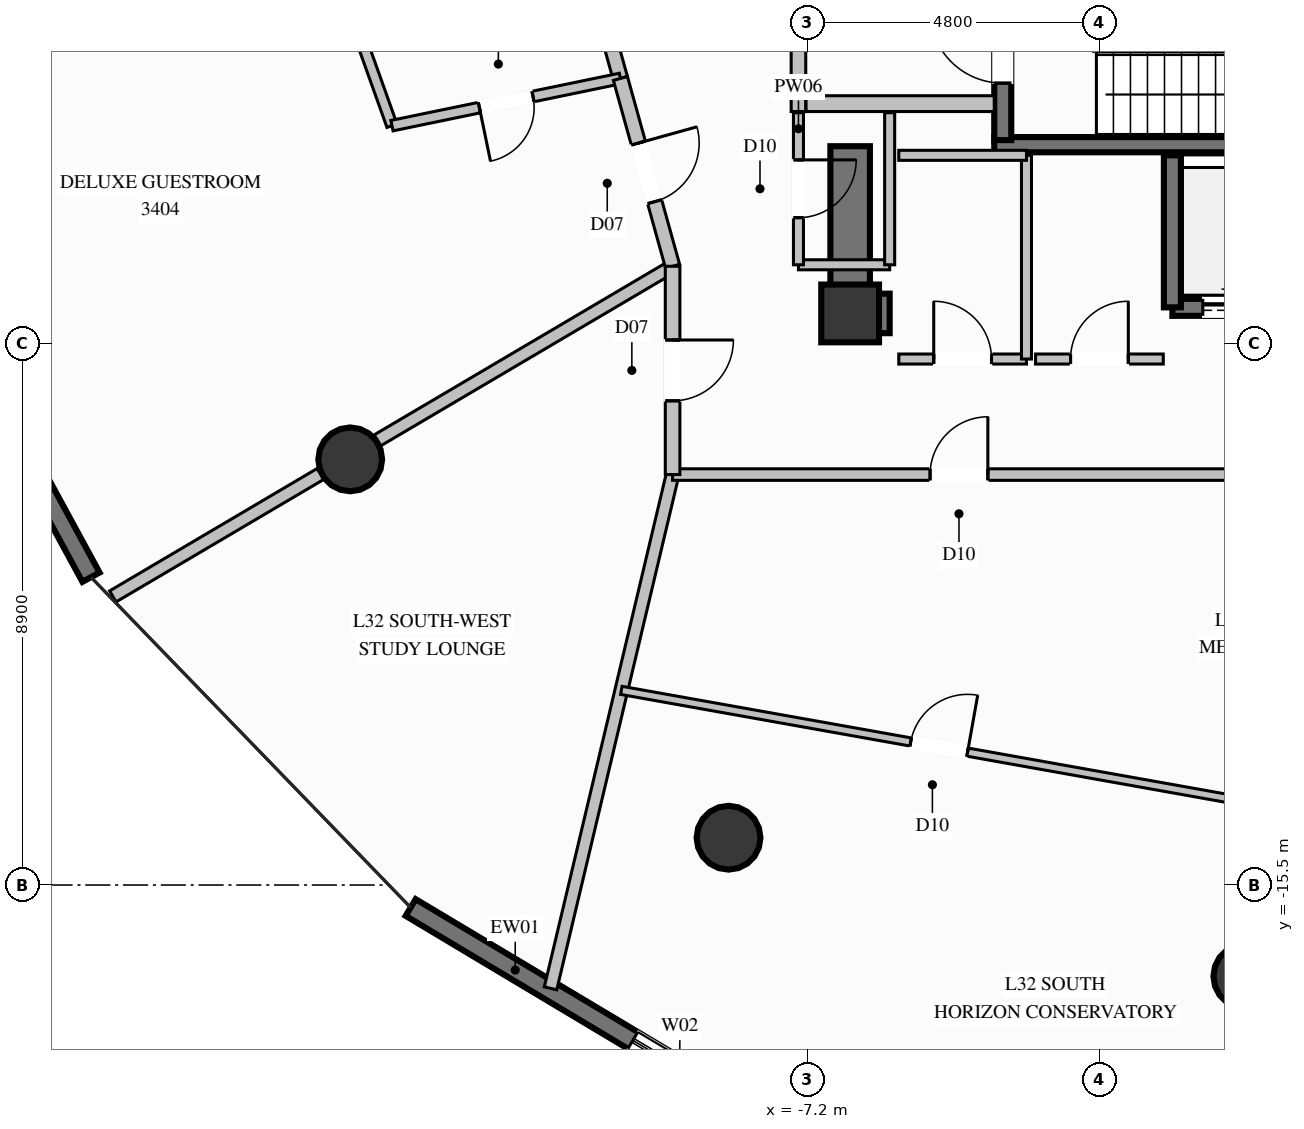
"""IFC4 building model, lengths in metres.
Left out: names, types, materials, properties, quantities, classifications, styles, units other than length and angle.
Written with IfcOpenShell. Run it as: python <this file> out.ifc"""

import sys

from ifc_helpers import new_model, si_unit, direction, frame, frame_2d, origin, origin_2d, place, context, subcontext, project, spatial, rectangle, circle, extrude, element, fill, save


model = new_model("IFC4")
c1 = context("Model", 3, precision=1e-05, world=origin(), true_north=direction((0.0, 1.0)))
c2 = subcontext(c1, "Body", "Model", "MODEL_VIEW")
j1 = project(units=[si_unit("LENGTHUNIT", "METRE"), si_unit("PLANEANGLEUNIT", "RADIAN")], contexts=[c1])
p1 = place(None, origin())
s1 = spatial("IfcSite", under=j1, at=p1, CompositionType="ELEMENT")
p2 = place(p1, origin())
s2 = spatial("IfcBuilding", under=s1, at=p2, CompositionType="ELEMENT")
p3 = place(p2, frame((0.0, 0.0, 127.8)))
s3 = spatial("IfcBuildingStorey", under=s2, at=p3, CompositionType="ELEMENT", Elevation=127.8)
p4 = place(p3, frame((-6.5, -6.1, 0.0), z_axis=(0.0, 0.0, 1.0), x_axis=(1.0, 0.0, 0.0)))
e1 = element("IfcColumn", 1, at=p4, inside=s3, PredefinedType="COLUMN", context=c2, shape_type="SweptSolid", body=[
    extrude(rectangle(XDim=0.95, YDim=0.95, at=origin_2d()), origin(), (0.0, 0.0, 1.0), 3.6),
])
p5 = place(p3, frame((-4.13, -3.325, 0.0), z_axis=(0.0, 0.0, 1.0), x_axis=(1.0, 0.0, 0.0)))
e2 = element("IfcWall", 2, at=p5, inside=s3, PredefinedType="SOLIDWALL", context=c2, shape_type="SweptSolid", body=[
    extrude(rectangle(XDim=8.26, YDim=0.25, at=frame_2d((4.13, 0.0))), origin(), (0.0, 0.0, 1.0), 3.6),
])
p6 = place(p3, frame((-6.175, -6.1, 0.0), z_axis=(0.0, 0.0, 1.0), x_axis=(1.0, 0.0, 0.0)))
e3 = element("IfcWall", 3, at=p6, inside=s3, PredefinedType="SHEAR", context=c2, shape_type="SweptSolid", body=[
    extrude(rectangle(XDim=0.325, YDim=0.65, at=frame_2d((0.163, 0.0))), origin(), (0.0, 0.0, 1.0), 3.6),
])
p7 = place(p3, frame((-6.5, -6.425, 0.0), z_axis=(0.0, 0.0, 1.0), x_axis=(0.0, 1.0, 0.0)))
e4 = element("IfcWall", 4, at=p7, inside=s3, PredefinedType="SHEAR", context=c2, shape_type="SweptSolid", body=[
    extrude(rectangle(XDim=3.075, YDim=0.65, at=frame_2d((1.538, 0.0))), origin(), (0.0, 0.0, 1.0), 3.6),
])
for number, where, z_axis, x_axis in (
    (5, (-14.722, -8.5, 0.0), (0.0, 0.0, 1.0), (1.0, 0.0, 0.0)),
    (6, (-8.5, -14.722, 0.0), (0.0, 0.0, 1.0), (1.0, 0.0, 0.0)),
    (7, (0.0, -17.0, 0.0), (0.0, 0.0, 1.0), (1.0, 0.0, 0.0)),
):
    element("IfcColumn", number, at=place(p3, frame(where, z_axis=z_axis, x_axis=x_axis)), inside=s3, PredefinedType="COLUMN", context=c2, shape_type="SweptSolid", body=[
        extrude(circle(Radius=0.525, at=origin_2d()), origin(), (0.0, 0.0, 1.0), 3.6),
    ])
p8 = place(p3, frame((-18.985, -10.438, 0.0), z_axis=(0.0, 0.0, 1.0), x_axis=(-0.478034683055, 0.878340959876, 0.0)))
e8 = element("IfcWall", 8, at=p8, inside=s3, PredefinedType="SOLIDWALL", context=c2, shape_type="SweptSolid", body=[
    extrude(rectangle(XDim=7.347, YDim=0.32, at=frame_2d((3.673, 0.0))), origin(), (0.0, 0.0, 1.0), 3.35),
])
p9 = place(p8, frame((2.773, 0.0, 0.35)))
e9 = element("IfcOpeningElement", 9, at=p9, cuts=e8, PredefinedType="OPENING", context=c2, shape_type="SweptSolid", body=[
    extrude(rectangle(XDim=1.8, YDim=2.6, at=frame_2d((0.9, 1.3))), frame((0.0, 0.17, 0.0), z_axis=(0.0, -1.0, 0.0), x_axis=(1.0, 0.0, 0.0)), (0.0, 0.0, 1.0), 0.34),
])
p10 = place(p3, frame((-7.24, -19.748, 0.0), z_axis=(0.0, 0.0, 1.0), x_axis=(-0.858360940194, 0.51304629065, 0.0)))
e10 = element("IfcWall", 10, at=p10, inside=s3, PredefinedType="SOLIDWALL", context=c2, shape_type="SweptSolid", body=[
    extrude(rectangle(XDim=7.559, YDim=0.32, at=frame_2d((3.779, 0.0))), origin(), (0.0, 0.0, 1.0), 3.35),
])
p11 = place(p10, frame((1.501, 0.0, 0.35)))
e11 = element("IfcOpeningElement", 11, at=p11, cuts=e10, PredefinedType="OPENING", context=c2, shape_type="SweptSolid", body=[
    extrude(rectangle(XDim=1.8, YDim=2.6, at=frame_2d((0.9, 1.3))), frame((0.0, 0.17, 0.0), z_axis=(0.0, -1.0, 0.0), x_axis=(1.0, 0.0, 0.0)), (0.0, 0.0, 1.0), 0.34),
])
p12 = place(p3, frame((-1.2, -6.0, 0.0), z_axis=(0.0, 0.0, 1.0), x_axis=(1.0, 0.0, 0.0)))
e12 = element("IfcWall", 12, at=p12, inside=s3, PredefinedType="SOLIDWALL", context=c2, shape_type="SweptSolid", body=[
    extrude(rectangle(XDim=2.1, YDim=0.28, at=frame_2d((1.05, 0.0))), origin(), (0.0, 0.0, 1.0), 3.35),
])
p13 = place(p12, frame((0.5, 0.0, 0.0)))
e13 = element("IfcOpeningElement", 13, at=p13, cuts=e12, PredefinedType="OPENING", context=c2, shape_type="SweptSolid", body=[
    extrude(rectangle(XDim=1.1, YDim=2.2, at=frame_2d((0.55, 1.1))), frame((0.0, 0.15, 0.0), z_axis=(0.0, -1.0, 0.0), x_axis=(1.0, 0.0, 0.0)), (0.0, 0.0, 1.0), 0.3),
])
p14 = place(p3, frame((-1.2, -3.5, 0.0), z_axis=(0.0, 0.0, 1.0), x_axis=(0.0, -1.0, 0.0)))
e14 = element("IfcWall", 14, at=p14, inside=s3, PredefinedType="SOLIDWALL", context=c2, shape_type="SweptSolid", body=[
    extrude(rectangle(XDim=2.5, YDim=0.28, at=frame_2d((1.25, 0.0))), origin(), (0.0, 0.0, 1.0), 3.35),
])
p15 = place(p3, frame((-3.99, -3.25, 0.0), z_axis=(0.0, 0.0, 1.0), x_axis=(0.0, 1.0, 0.0)))
e15 = element("IfcWall", 15, at=p15, inside=s3, PredefinedType="SOLIDWALL", context=c2, shape_type="SweptSolid", body=[
    extrude(rectangle(XDim=5.46, YDim=0.28, at=frame_2d((2.73, 0.0))), origin(), (0.0, 0.0, 1.0), 3.35),
])
p16 = place(p15, frame((0.937, 0.0, 0.0)))
e16 = element("IfcOpeningElement", 16, at=p16, cuts=e15, PredefinedType="OPENING", context=c2, shape_type="SweptSolid", body=[
    extrude(rectangle(XDim=1.2, YDim=2.2, at=frame_2d((0.6, 1.1))), frame((0.0, 0.15, 0.0), z_axis=(0.0, -1.0, 0.0), x_axis=(1.0, 0.0, 0.0)), (0.0, 0.0, 1.0), 0.3),
])
p17 = place(p3, frame((-7.35, -2.78, 0.0), z_axis=(0.0, 0.0, 1.0), x_axis=(0.0, 1.0, 0.0)))
e17 = element("IfcWall", 17, at=p17, inside=s3, PredefinedType="PARTITIONING", context=c2, shape_type="SweptSolid", body=[
    extrude(rectangle(XDim=5.12, YDim=0.24, at=frame_2d((2.56, 0.0))), origin(), (0.0, 0.0, 1.0), 2.435),
])
p18 = place(p17, frame((1.389, 0.0, 0.0)))
e18 = element("IfcOpeningElement", 18, at=p18, cuts=e17, PredefinedType="OPENING", context=c2, shape_type="SweptSolid", body=[
    extrude(rectangle(XDim=1.15, YDim=2.2, at=frame_2d((0.575, 1.1))), frame((0.0, 0.13, 0.0), z_axis=(0.0, -1.0, 0.0), x_axis=(1.0, 0.0, 0.0)), (0.0, 0.0, 1.0), 0.26),
])
p19 = place(p3, frame((-7.225, -2.65, 0.0), z_axis=(0.0, 0.0, 1.0), x_axis=(1.0, 0.0, 0.0)))
e19 = element("IfcWall", 19, at=p19, inside=s3, PredefinedType="PARTITIONING", context=c2, shape_type="SweptSolid", body=[
    extrude(rectangle(XDim=3.095, YDim=0.26, at=frame_2d((1.548, 0.0))), origin(), (0.0, 0.0, 1.0), 3.35),
])
p20 = place(p3, frame((-7.35, -5.3, 0.0), z_axis=(0.0, 0.0, 1.0), x_axis=(1.0, 0.0, 0.0)))
e20 = element("IfcWall", 20, at=p20, inside=s3, PredefinedType="PARTITIONING", context=c2, shape_type="SweptSolid", body=[
    extrude(rectangle(XDim=1.5, YDim=0.165, at=frame_2d((0.75, 0.0))), origin(), (0.0, 0.0, 1.0), 2.435),
])
p21 = place(p3, frame((-5.85, -5.3, 0.0), z_axis=(0.0, 0.0, 1.0), x_axis=(0.0, 1.0, 0.0)))
e21 = element("IfcWall", 21, at=p21, inside=s3, PredefinedType="PARTITIONING", context=c2, shape_type="SweptSolid", body=[
    extrude(rectangle(XDim=2.5, YDim=0.165, at=frame_2d((1.25, 0.0))), origin(), (0.0, 0.0, 1.0), 2.435),
])
p22 = place(p3, frame((-7.35, -2.8, 0.0), z_axis=(0.0, 0.0, 1.0), x_axis=(0.0, -1.0, 0.0)))
e22 = element("IfcWall", 22, at=p22, inside=s3, PredefinedType="PARTITIONING", context=c2, shape_type="SweptSolid", body=[
    extrude(rectangle(XDim=2.5, YDim=0.165, at=frame_2d((1.25, 0.0))), origin(), (0.0, 0.0, 1.0), 3.35),
])
p23 = place(p22, frame((0.775, 0.0, 0.0)))
e23 = element("IfcOpeningElement", 23, at=p23, cuts=e22, PredefinedType="OPENING", context=c2, shape_type="SweptSolid", body=[
    extrude(rectangle(XDim=0.95, YDim=2.1, at=frame_2d((0.475, 1.05))), frame((0.0, 0.093, 0.0), z_axis=(0.0, -1.0, 0.0), x_axis=(1.0, 0.0, 0.0)), (0.0, 0.0, 1.0), 0.185),
])
p24 = place(p3, frame((-5.7, -6.85, 0.0), z_axis=(0.0, 0.0, 1.0), x_axis=(1.0, 0.0, 0.0)))
e24 = element("IfcWall", 24, at=p24, inside=s3, PredefinedType="PARTITIONING", context=c2, shape_type="SweptSolid", body=[
    extrude(rectangle(XDim=2.1, YDim=0.165, at=frame_2d((1.05, 0.0))), origin(), (0.0, 0.0, 1.0), 2.435),
])
p25 = place(p24, frame((0.575, 0.0, 0.0)))
e25 = element("IfcOpeningElement", 25, at=p25, cuts=e24, PredefinedType="OPENING", context=c2, shape_type="SweptSolid", body=[
    extrude(rectangle(XDim=0.95, YDim=2.1, at=frame_2d((0.475, 1.05))), frame((0.0, 0.093, 0.0), z_axis=(0.0, -1.0, 0.0), x_axis=(1.0, 0.0, 0.0)), (0.0, 0.0, 1.0), 0.185),
])
p26 = place(p3, frame((-3.6, -6.85, 0.0), z_axis=(0.0, 0.0, 1.0), x_axis=(0.0, 1.0, 0.0)))
e26 = element("IfcWall", 26, at=p26, inside=s3, PredefinedType="PARTITIONING", context=c2, shape_type="SweptSolid", body=[
    extrude(rectangle(XDim=3.35, YDim=0.165, at=frame_2d((1.675, 0.0))), origin(), (0.0, 0.0, 1.0), 3.35),
])
p27 = place(p3, frame((-3.6, -3.5, 0.0), z_axis=(0.0, 0.0, 1.0), x_axis=(-1.0, 0.0, 0.0)))
e27 = element("IfcWall", 27, at=p27, inside=s3, PredefinedType="PARTITIONING", context=c2, shape_type="SweptSolid", body=[
    extrude(rectangle(XDim=2.1, YDim=0.165, at=frame_2d((1.05, 0.0))), origin(), (0.0, 0.0, 1.0), 3.35),
])
p28 = place(p3, frame((-3.45, -6.85, 0.0), z_axis=(0.0, 0.0, 1.0), x_axis=(1.0, 0.0, 0.0)))
e28 = element("IfcWall", 28, at=p28, inside=s3, PredefinedType="PARTITIONING", context=c2, shape_type="SweptSolid", body=[
    extrude(rectangle(XDim=2.1, YDim=0.165, at=frame_2d((1.05, 0.0))), origin(), (0.0, 0.0, 1.0), 2.435),
])
p29 = place(p28, frame((0.575, 0.0, 0.0)))
e29 = element("IfcOpeningElement", 29, at=p29, cuts=e28, PredefinedType="OPENING", context=c2, shape_type="SweptSolid", body=[
    extrude(rectangle(XDim=0.95, YDim=2.1, at=frame_2d((0.475, 1.05))), frame((0.0, 0.093, 0.0), z_axis=(0.0, -1.0, 0.0), x_axis=(1.0, 0.0, 0.0)), (0.0, 0.0, 1.0), 0.185),
])
p30 = place(p3, frame((-9.42, -5.325, 0.0), z_axis=(0.0, 0.0, 1.0), x_axis=(-0.861378052692, -0.507964418381, 0.0)))
e30 = element("IfcWall", 30, at=p30, inside=s3, PredefinedType="PARTITIONING", context=c2, shape_type="SweptSolid", body=[
    extrude(rectangle(XDim=5.636, YDim=0.21, at=frame_2d((2.818, 0.0))), origin(), (0.0, 0.0, 1.0), 2.717),
])
p31 = place(p3, frame((-15.211, -8.74, 0.0), z_axis=(0.0, 0.0, 1.0), x_axis=(-0.861374884853, -0.507969790188, 0.0)))
e31 = element("IfcWall", 31, at=p31, inside=s3, PredefinedType="PARTITIONING", context=c2, shape_type="SweptSolid", body=[
    extrude(rectangle(XDim=3.965, YDim=0.21, at=frame_2d((1.982, 0.0))), origin(), (0.0, 0.0, 1.0), 3.35),
])
p32 = place(p3, frame((-10.9, 0.0, 0.0), z_axis=(0.0, 0.0, 1.0), x_axis=(0.267920543299, -0.963441011416, 0.0)))
e32 = element("IfcWall", 32, at=p32, inside=s3, PredefinedType="PARTITIONING", context=c2, shape_type="SweptSolid", body=[
    extrude(rectangle(XDim=2.321, YDim=0.24, at=frame_2d((1.161, 0.0))), origin(), (0.0, 0.0, 1.0), 3.35),
])
p33 = place(p3, frame((-15.111, 0.0, 0.0), z_axis=(0.0, 0.0, 1.0), x_axis=(0.336466950823, -0.941695275025, 0.0)))
e33 = element("IfcWall", 33, at=p33, inside=s3, PredefinedType="PLUMBINGWALL", context=c2, shape_type="SweptSolid", body=[
    extrude(rectangle(XDim=3.198, YDim=0.175, at=frame_2d((1.599, 0.0))), origin(), (0.0, 0.0, 1.0), 3.35),
])
p34 = place(p3, frame((-10.278, -2.236, 0.0), z_axis=(0.0, 0.0, 1.0), x_axis=(-0.979332635471, -0.202256246135, 0.0)))
e34 = element("IfcWall", 34, at=p34, inside=s3, PredefinedType="PLUMBINGWALL", context=c2, shape_type="SweptSolid", body=[
    extrude(rectangle(XDim=3.836, YDim=0.175, at=frame_2d((1.918, 0.0))), origin(), (0.0, 0.0, 1.0), 3.35),
])
p35 = place(p34, frame((1.468, 0.0, 0.0)))
e35 = element("IfcOpeningElement", 35, at=p35, cuts=e34, PredefinedType="OPENING", context=c2, shape_type="SweptSolid", body=[
    extrude(rectangle(XDim=0.9, YDim=2.1, at=frame_2d((0.45, 1.05))), frame((0.0, 0.098, 0.0), z_axis=(0.0, -1.0, 0.0), x_axis=(1.0, 0.0, 0.0)), (0.0, 0.0, 1.0), 0.195),
])
p36 = place(p3, frame((-10.278, -2.236, 0.0), z_axis=(0.0, 0.0, 1.0), x_axis=(0.267683140967, -0.96350699844, 0.0)))
e36 = element("IfcWall", 36, at=p36, inside=s3, PredefinedType="PARTITIONING", context=c2, shape_type="SweptSolid", body=[
    extrude(rectangle(XDim=3.206, YDim=0.24, at=frame_2d((1.603, 0.0))), origin(), (0.0, 0.0, 1.0), 3.35),
])
p37 = place(p36, frame((1.103, 0.0, 0.0)))
e37 = element("IfcOpeningElement", 37, at=p37, cuts=e36, PredefinedType="OPENING", context=c2, shape_type="SweptSolid", body=[
    extrude(rectangle(XDim=1.0, YDim=2.2, at=frame_2d((0.5, 1.1))), frame((0.0, 0.13, 0.0), z_axis=(0.0, -1.0, 0.0), x_axis=(1.0, 0.0, 0.0)), (0.0, 0.0, 1.0), 0.26),
])
p38 = place(p3, frame((-9.42, -8.75, 0.0), z_axis=(0.0, 0.0, 1.0), x_axis=(-0.231121330831, -0.972924935663, 0.0)))
e38 = element("IfcWall", 38, at=p38, inside=s3, PredefinedType="PARTITIONING", context=c2, shape_type="SweptSolid", body=[
    extrude(rectangle(XDim=8.684, YDim=0.21, at=frame_2d((4.342, 0.0))), origin(), (0.0, 0.0, 1.0), 3.35),
])
p39 = place(p3, frame((-9.42, -8.75, 0.0), z_axis=(0.0, 0.0, 1.0), x_axis=(1.0, 0.0, 0.0)))
e39 = element("IfcWall", 39, at=p39, inside=s3, PredefinedType="PARTITIONING", context=c2, shape_type="SweptSolid", body=[
    extrude(rectangle(XDim=9.42, YDim=0.19, at=frame_2d((4.71, 0.0))), origin(), (0.0, 0.0, 1.0), 3.35),
])
p40 = place(p39, frame((4.235, 0.0, 0.0)))
e40 = element("IfcOpeningElement", 40, at=p40, cuts=e39, PredefinedType="OPENING", context=c2, shape_type="SweptSolid", body=[
    extrude(rectangle(XDim=0.95, YDim=2.1, at=frame_2d((0.475, 1.05))), frame((0.0, 0.105, 0.0), z_axis=(0.0, -1.0, 0.0), x_axis=(1.0, 0.0, 0.0)), (0.0, 0.0, 1.0), 0.21),
])
p41 = place(p3, frame((-9.42, -5.325, 0.0), z_axis=(0.0, 0.0, 1.0), x_axis=(0.0, -1.0, 0.0)))
e41 = element("IfcWall", 41, at=p41, inside=s3, PredefinedType="PARTITIONING", context=c2, shape_type="SweptSolid", body=[
    extrude(rectangle(XDim=3.425, YDim=0.24, at=frame_2d((1.712, 0.0))), origin(), (0.0, 0.0, 1.0), 3.35),
])
p42 = place(p41, frame((1.212, 0.0, 0.0)))
e42 = element("IfcOpeningElement", 42, at=p42, cuts=e41, PredefinedType="OPENING", context=c2, shape_type="SweptSolid", body=[
    extrude(rectangle(XDim=1.0, YDim=2.2, at=frame_2d((0.5, 1.1))), frame((0.0, 0.13, 0.0), z_axis=(0.0, -1.0, 0.0), x_axis=(1.0, 0.0, 0.0)), (0.0, 0.0, 1.0), 0.26),
])
p43 = place(p3, frame((-10.263, -12.299, 0.0), z_axis=(0.0, 0.0, 1.0), x_axis=(0.984469470269, -0.175555866063, 0.0)))
e43 = element("IfcWall", 43, at=p43, inside=s3, PredefinedType="PARTITIONING", context=c2, shape_type="SweptSolid", body=[
    extrude(rectangle(XDim=10.618, YDim=0.135, at=frame_2d((5.309, 0.0))), origin(), (0.0, 0.0, 1.0), 3.35),
])
p44 = place(p43, frame((4.834, 0.0, 0.0)))
e44 = element("IfcOpeningElement", 44, at=p44, cuts=e43, PredefinedType="OPENING", context=c2, shape_type="SweptSolid", body=[
    extrude(rectangle(XDim=0.95, YDim=2.1, at=frame_2d((0.475, 1.05))), frame((0.0, 0.078, 0.0), z_axis=(0.0, -1.0, 0.0), x_axis=(1.0, 0.0, 0.0)), (0.0, 0.0, 1.0), 0.155),
])
p45 = place(p11, origin())
e45 = element("IfcWindow", 45, at=p45, inside=s3, PartitioningType="SINGLE_PANEL", PredefinedType="WINDOW", context=c2, shape_type="SweptSolid", body=[
    extrude(rectangle(XDim=1.8, YDim=2.6, at=frame_2d((0.9, 1.3))), frame((0.0, 0.03, 0.0), z_axis=(0.0, -1.0, 0.0), x_axis=(1.0, 0.0, 0.0)), (0.0, 0.0, 1.0), 0.06),
])
fill(e11, e45)
p46 = place(p13, origin())
e46 = element("IfcDoor", 46, at=p46, inside=s3, OperationType="SLIDING_TO_LEFT", PredefinedType="DOOR", context=c2, shape_type="SweptSolid", body=[
    extrude(rectangle(XDim=1.1, YDim=2.2, at=frame_2d((0.55, 1.1))), frame((0.0, 0.025, 0.0), z_axis=(0.0, -1.0, 0.0), x_axis=(1.0, 0.0, 0.0)), (0.0, 0.0, 1.0), 0.05),
])
fill(e13, e46)
p47 = place(p16, origin())
e47 = element("IfcDoor", 47, at=p47, inside=s3, OperationType="SINGLE_SWING_RIGHT", PredefinedType="DOOR", context=c2, shape_type="SweptSolid", body=[
    extrude(rectangle(XDim=1.2, YDim=2.2, at=frame_2d((0.6, 1.1))), frame((0.0, 0.025, 0.0), z_axis=(0.0, -1.0, 0.0), x_axis=(1.0, 0.0, 0.0)), (0.0, 0.0, 1.0), 0.05),
])
fill(e16, e47)
p48 = place(p23, origin())
e48 = element("IfcDoor", 48, at=p48, inside=s3, OperationType="SINGLE_SWING_LEFT", PredefinedType="DOOR", context=c2, shape_type="SweptSolid", body=[
    extrude(rectangle(XDim=0.95, YDim=2.1, at=frame_2d((0.475, 1.05))), frame((0.0, 0.025, 0.0), z_axis=(0.0, -1.0, 0.0), x_axis=(1.0, 0.0, 0.0)), (0.0, 0.0, 1.0), 0.05),
])
fill(e23, e48)
p49 = place(p25, origin())
e49 = element("IfcDoor", 49, at=p49, inside=s3, OperationType="SINGLE_SWING_LEFT", PredefinedType="DOOR", context=c2, shape_type="SweptSolid", body=[
    extrude(rectangle(XDim=0.95, YDim=2.1, at=frame_2d((0.475, 1.05))), frame((0.0, 0.025, 0.0), z_axis=(0.0, -1.0, 0.0), x_axis=(1.0, 0.0, 0.0)), (0.0, 0.0, 1.0), 0.05),
])
fill(e25, e49)
p50 = place(p29, origin())
e50 = element("IfcDoor", 50, at=p50, inside=s3, OperationType="SINGLE_SWING_RIGHT", PredefinedType="DOOR", context=c2, shape_type="SweptSolid", body=[
    extrude(rectangle(XDim=0.95, YDim=2.1, at=frame_2d((0.475, 1.05))), frame((0.0, 0.025, 0.0), z_axis=(0.0, -1.0, 0.0), x_axis=(1.0, 0.0, 0.0)), (0.0, 0.0, 1.0), 0.05),
])
fill(e29, e50)
p51 = place(p35, origin())
e51 = element("IfcDoor", 51, at=p51, inside=s3, OperationType="SINGLE_SWING_RIGHT", PredefinedType="DOOR", context=c2, shape_type="SweptSolid", body=[
    extrude(rectangle(XDim=0.9, YDim=2.1, at=frame_2d((0.45, 1.05))), frame((0.0, 0.025, 0.0), z_axis=(0.0, -1.0, 0.0), x_axis=(1.0, 0.0, 0.0)), (0.0, 0.0, 1.0), 0.05),
])
fill(e35, e51)
p52 = place(p37, origin())
e52 = element("IfcDoor", 52, at=p52, inside=s3, OperationType="SINGLE_SWING_LEFT", PredefinedType="DOOR", context=c2, shape_type="SweptSolid", body=[
    extrude(rectangle(XDim=1.0, YDim=2.2, at=frame_2d((0.5, 1.1))), frame((0.0, 0.025, 0.0), z_axis=(0.0, -1.0, 0.0), x_axis=(1.0, 0.0, 0.0)), (0.0, 0.0, 1.0), 0.05),
])
fill(e37, e52)
p53 = place(p40, origin())
e53 = element("IfcDoor", 53, at=p53, inside=s3, OperationType="SINGLE_SWING_RIGHT", PredefinedType="DOOR", context=c2, shape_type="SweptSolid", body=[
    extrude(rectangle(XDim=0.95, YDim=2.1, at=frame_2d((0.475, 1.05))), frame((0.0, 0.025, 0.0), z_axis=(0.0, -1.0, 0.0), x_axis=(1.0, 0.0, 0.0)), (0.0, 0.0, 1.0), 0.05),
])
fill(e40, e53)
p54 = place(p42, origin())
e54 = element("IfcDoor", 54, at=p54, inside=s3, OperationType="SINGLE_SWING_LEFT", PredefinedType="DOOR", context=c2, shape_type="SweptSolid", body=[
    extrude(rectangle(XDim=1.0, YDim=2.2, at=frame_2d((0.5, 1.1))), frame((0.0, 0.025, 0.0), z_axis=(0.0, -1.0, 0.0), x_axis=(1.0, 0.0, 0.0)), (0.0, 0.0, 1.0), 0.05),
])
fill(e42, e54)
p55 = place(p44, origin())
e55 = element("IfcDoor", 55, at=p55, inside=s3, OperationType="SINGLE_SWING_RIGHT", PredefinedType="DOOR", context=c2, shape_type="SweptSolid", body=[
    extrude(rectangle(XDim=0.95, YDim=2.1, at=frame_2d((0.475, 1.05))), frame((0.0, 0.025, 0.0), z_axis=(0.0, -1.0, 0.0), x_axis=(1.0, 0.0, 0.0)), (0.0, 0.0, 1.0), 0.05),
])
fill(e44, e55)
save(model, sys.argv[1])
